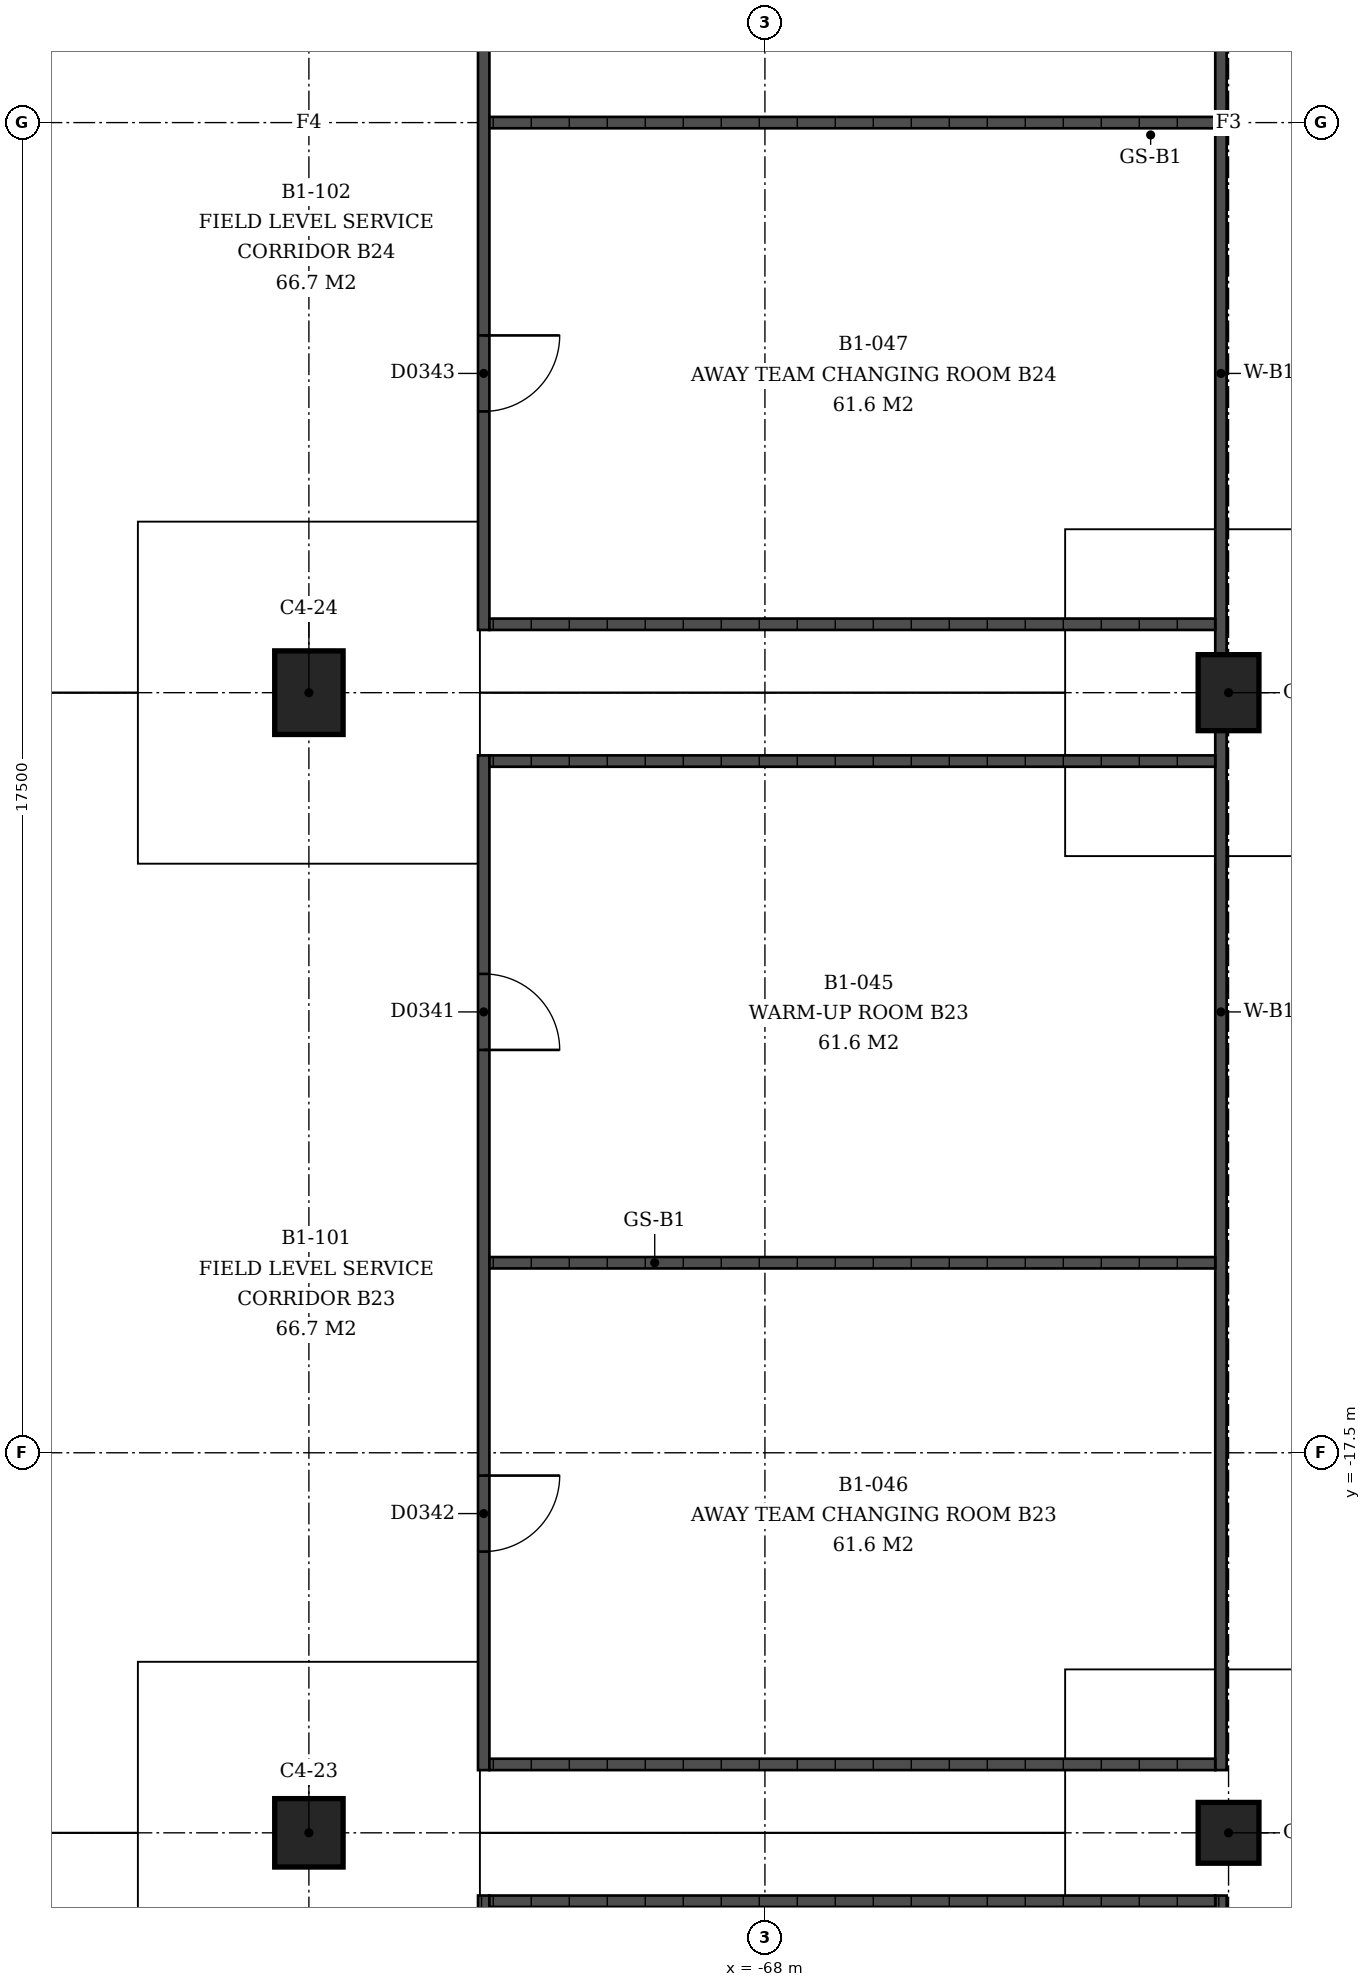
"""IFC4 building model, lengths in metres.
Left out: names, types, materials, properties, quantities, classifications, styles, units other than length and angle.
Written with IfcOpenShell. Run it as: python <this file> out.ifc"""

import sys

from ifc_helpers import new_model, si_unit, direction, frame, frame_2d, origin, origin_2d, place, context, subcontext, project, spatial, rectangle, extrude, element, fill, save


model = new_model("IFC4")
c1 = context("Model", 3, precision=1e-05, world=origin(), true_north=direction((0.0, 1.0)))
c2 = subcontext(c1, "Body", "Model", "MODEL_VIEW")
j1 = project(units=[si_unit("LENGTHUNIT", "METRE"), si_unit("PLANEANGLEUNIT", "RADIAN")], contexts=[c1])
p1 = place(None, origin())
s1 = spatial("IfcSite", under=j1, at=p1, CompositionType="ELEMENT")
p2 = place(p1, origin())
s2 = spatial("IfcBuilding", under=s1, at=p2, CompositionType="ELEMENT")
p3 = place(p2, frame((0.0, 0.0, -4.5)))
s3 = spatial("IfcBuildingStorey", under=s2, at=p3, CompositionType="ELEMENT", Elevation=-4.5)
p4 = place(p3, frame((-61.9, -22.5, 0.0), z_axis=(0.0, 0.0, 1.0), x_axis=(0.0, -1.0, 0.0)))
e1 = element("IfcColumn", 1, at=p4, inside=s3, PredefinedType="COLUMN", context=c2, shape_type="SweptSolid", body=[
    extrude(rectangle(XDim=0.8, YDim=0.8, at=origin_2d()), origin(), (0.0, 0.0, 1.0), 4.5),
])
p5 = place(p3, frame((-74.0, -22.5, 0.0), z_axis=(0.0, 0.0, 1.0), x_axis=(0.0, -1.0, 0.0)))
e2 = element("IfcColumn", 2, at=p5, inside=s3, PredefinedType="COLUMN", context=c2, shape_type="SweptSolid", body=[
    extrude(rectangle(XDim=0.9, YDim=0.9, at=origin_2d()), origin(), (0.0, 0.0, 1.0), 4.5),
])
p6 = place(p3, frame((-61.9, -7.5, 0.0), z_axis=(0.0, 0.0, 1.0), x_axis=(0.0, -1.0, 0.0)))
e3 = element("IfcColumn", 3, at=p6, inside=s3, PredefinedType="COLUMN", context=c2, shape_type="SweptSolid", body=[
    extrude(rectangle(XDim=1.0, YDim=0.8, at=origin_2d()), origin(), (0.0, 0.0, 1.0), 4.5),
])
p7 = place(p3, frame((-74.0, -7.5, 0.0), z_axis=(0.0, 0.0, 1.0), x_axis=(0.0, -1.0, 0.0)))
e4 = element("IfcColumn", 4, at=p7, inside=s3, PredefinedType="COLUMN", context=c2, shape_type="SweptSolid", body=[
    extrude(rectangle(XDim=1.1, YDim=0.9, at=origin_2d()), origin(), (0.0, 0.0, 1.0), 4.5),
])
p8 = place(p3, frame((-62.0, -37.0, 0.0), z_axis=(0.0, 0.0, 1.0), x_axis=(0.0, 1.0, 0.0)))
e5 = element("IfcWall", 5, at=p8, inside=s3, PredefinedType="SOLIDWALL", context=c2, shape_type="SweptSolid", body=[
    extrude(rectangle(XDim=13.675, YDim=0.15, at=frame_2d((6.837, 0.0))), origin(), (0.0, 0.0, 1.0), 3.0),
])
p9 = place(p3, frame((-71.7, -36.675, 0.0), z_axis=(0.0, 0.0, 1.0), x_axis=(0.0, 1.0, 0.0)))
e6 = element("IfcWall", 6, at=p9, inside=s3, PredefinedType="SOLIDWALL", context=c2, shape_type="SweptSolid", body=[
    extrude(rectangle(XDim=13.35, YDim=0.15, at=frame_2d((6.675, 0.0))), origin(), (0.0, 0.0, 1.0), 3.0),
])
p10 = place(p9, frame((2.875, 0.0, 0.0)))
e7 = element("IfcOpeningElement", 7, at=p10, cuts=e6, PredefinedType="OPENING", context=c2, shape_type="SweptSolid", body=[
    extrude(rectangle(XDim=1.0, YDim=2.1, at=frame_2d((0.5, 1.05))), frame((0.0, 0.075, 0.0), z_axis=(0.0, -1.0, 0.0), x_axis=(1.0, 0.0, 0.0)), (0.0, 0.0, 1.0), 0.15),
])
p11 = place(p9, frame((9.475, 0.0, 0.0)))
e8 = element("IfcOpeningElement", 8, at=p11, cuts=e6, PredefinedType="OPENING", context=c2, shape_type="SweptSolid", body=[
    extrude(rectangle(XDim=1.0, YDim=2.1, at=frame_2d((0.5, 1.05))), frame((0.0, 0.075, 0.0), z_axis=(0.0, -1.0, 0.0), x_axis=(1.0, 0.0, 0.0)), (0.0, 0.0, 1.0), 0.15),
])
p12 = place(p3, frame((-62.075, -23.4, 0.0), z_axis=(0.0, 0.0, 1.0), x_axis=(-1.0, 0.0, 0.0)))
e9 = element("IfcWall", 9, at=p12, inside=s3, PredefinedType="SOLIDWALL", context=c2, shape_type="SweptSolid", body=[
    extrude(rectangle(XDim=9.55, YDim=0.15, at=frame_2d((4.775, 0.0))), origin(), (0.0, 0.0, 1.0), 3.0),
])
p13 = place(p3, frame((-62.0, -8.0, 0.0), z_axis=(0.0, 0.0, 1.0), x_axis=(0.0, -1.0, 0.0)))
e10 = element("IfcWall", 10, at=p13, inside=s3, PredefinedType="SOLIDWALL", context=c2, shape_type="SweptSolid", body=[
    extrude(rectangle(XDim=13.675, YDim=0.15, at=frame_2d((6.837, 0.0))), origin(), (0.0, 0.0, 1.0), 3.0),
])
p14 = place(p3, frame((-71.7, -8.325, 0.0), z_axis=(0.0, 0.0, 1.0), x_axis=(0.0, -1.0, 0.0)))
e11 = element("IfcWall", 11, at=p14, inside=s3, PredefinedType="SOLIDWALL", context=c2, shape_type="SweptSolid", body=[
    extrude(rectangle(XDim=13.35, YDim=0.15, at=frame_2d((6.675, 0.0))), origin(), (0.0, 0.0, 1.0), 3.0),
])
p15 = place(p14, frame((2.875, 0.0, 0.0)))
e12 = element("IfcOpeningElement", 12, at=p15, cuts=e11, PredefinedType="OPENING", context=c2, shape_type="SweptSolid", body=[
    extrude(rectangle(XDim=1.0, YDim=2.1, at=frame_2d((0.5, 1.05))), frame((0.0, 0.075, 0.0), z_axis=(0.0, -1.0, 0.0), x_axis=(1.0, 0.0, 0.0)), (0.0, 0.0, 1.0), 0.15),
])
p16 = place(p14, frame((9.475, 0.0, 0.0)))
e13 = element("IfcOpeningElement", 13, at=p16, cuts=e11, PredefinedType="OPENING", context=c2, shape_type="SweptSolid", body=[
    extrude(rectangle(XDim=1.0, YDim=2.1, at=frame_2d((0.5, 1.05))), frame((0.0, 0.075, 0.0), z_axis=(0.0, -1.0, 0.0), x_axis=(1.0, 0.0, 0.0)), (0.0, 0.0, 1.0), 0.15),
])
for number, where, z_axis, x_axis in (
    (14, (-62.075, -8.4, 0.0), (0.0, 0.0, 1.0), (-1.0, 0.0, 0.0)),
    (15, (-62.075, -15.0, 0.0), (0.0, 0.0, 1.0), (-1.0, 0.0, 0.0)),
    (16, (-62.075, -21.6, 0.0), (0.0, 0.0, 1.0), (-1.0, 0.0, 0.0)),
):
    element("IfcWall", number, at=place(p3, frame(where, z_axis=z_axis, x_axis=x_axis)), inside=s3, PredefinedType="SOLIDWALL", context=c2, shape_type="SweptSolid", body=[
        extrude(rectangle(XDim=9.55, YDim=0.15, at=frame_2d((4.775, 0.0))), origin(), (0.0, 0.0, 1.0), 3.0),
    ])
p17 = place(p3, frame((-62.0, -7.0, 0.0), z_axis=(0.0, 0.0, 1.0), x_axis=(0.0, 1.0, 0.0)))
e17 = element("IfcWall", 17, at=p17, inside=s3, PredefinedType="SOLIDWALL", context=c2, shape_type="SweptSolid", body=[
    extrude(rectangle(XDim=13.675, YDim=0.15, at=frame_2d((6.837, 0.0))), origin(), (0.0, 0.0, 1.0), 3.0),
])
p18 = place(p3, frame((-71.7, -6.675, 0.0), z_axis=(0.0, 0.0, 1.0), x_axis=(0.0, 1.0, 0.0)))
e18 = element("IfcWall", 18, at=p18, inside=s3, PredefinedType="SOLIDWALL", context=c2, shape_type="SweptSolid", body=[
    extrude(rectangle(XDim=13.35, YDim=0.15, at=frame_2d((6.675, 0.0))), origin(), (0.0, 0.0, 1.0), 3.0),
])
p19 = place(p18, frame((2.875, 0.0, 0.0)))
e19 = element("IfcOpeningElement", 19, at=p19, cuts=e18, PredefinedType="OPENING", context=c2, shape_type="SweptSolid", body=[
    extrude(rectangle(XDim=1.0, YDim=2.1, at=frame_2d((0.5, 1.05))), frame((0.0, 0.075, 0.0), z_axis=(0.0, -1.0, 0.0), x_axis=(1.0, 0.0, 0.0)), (0.0, 0.0, 1.0), 0.15),
])
p20 = place(p18, frame((9.475, 0.0, 0.0)))
e20 = element("IfcOpeningElement", 20, at=p20, cuts=e18, PredefinedType="OPENING", context=c2, shape_type="SweptSolid", body=[
    extrude(rectangle(XDim=1.0, YDim=2.1, at=frame_2d((0.5, 1.05))), frame((0.0, 0.075, 0.0), z_axis=(0.0, -1.0, 0.0), x_axis=(1.0, 0.0, 0.0)), (0.0, 0.0, 1.0), 0.15),
])
for number, where, z_axis, x_axis in (
    (21, (-62.075, -6.6, 0.0), (0.0, 0.0, 1.0), (-1.0, 0.0, 0.0)),
    (22, (-62.075, 0.0, 0.0), (0.0, 0.0, 1.0), (-1.0, 0.0, 0.0)),
):
    element("IfcWall", number, at=place(p3, frame(where, z_axis=z_axis, x_axis=x_axis)), inside=s3, PredefinedType="SOLIDWALL", context=c2, shape_type="SweptSolid", body=[
        extrude(rectangle(XDim=9.55, YDim=0.15, at=frame_2d((4.775, 0.0))), origin(), (0.0, 0.0, 1.0), 3.0),
    ])
p21 = place(p15, origin())
e23 = element("IfcDoor", 23, at=p21, inside=s3, OperationType="SINGLE_SWING_LEFT", PredefinedType="DOOR", context=c2, shape_type="SweptSolid", body=[
    extrude(rectangle(XDim=1.0, YDim=2.1, at=frame_2d((0.5, 1.05))), frame((0.0, 0.025, 0.0), z_axis=(0.0, -1.0, 0.0), x_axis=(1.0, 0.0, 0.0)), (0.0, 0.0, 1.0), 0.05),
])
fill(e12, e23)
p22 = place(p16, origin())
e24 = element("IfcDoor", 24, at=p22, inside=s3, OperationType="SINGLE_SWING_RIGHT", PredefinedType="DOOR", context=c2, shape_type="SweptSolid", body=[
    extrude(rectangle(XDim=1.0, YDim=2.1, at=frame_2d((0.5, 1.05))), frame((0.0, 0.025, 0.0), z_axis=(0.0, -1.0, 0.0), x_axis=(1.0, 0.0, 0.0)), (0.0, 0.0, 1.0), 0.05),
])
fill(e13, e24)
p23 = place(p19, origin())
e25 = element("IfcDoor", 25, at=p23, inside=s3, OperationType="SINGLE_SWING_RIGHT", PredefinedType="DOOR", context=c2, shape_type="SweptSolid", body=[
    extrude(rectangle(XDim=1.0, YDim=2.1, at=frame_2d((0.5, 1.05))), frame((0.0, 0.025, 0.0), z_axis=(0.0, -1.0, 0.0), x_axis=(1.0, 0.0, 0.0)), (0.0, 0.0, 1.0), 0.05),
])
fill(e19, e25)
save(model, sys.argv[1])
